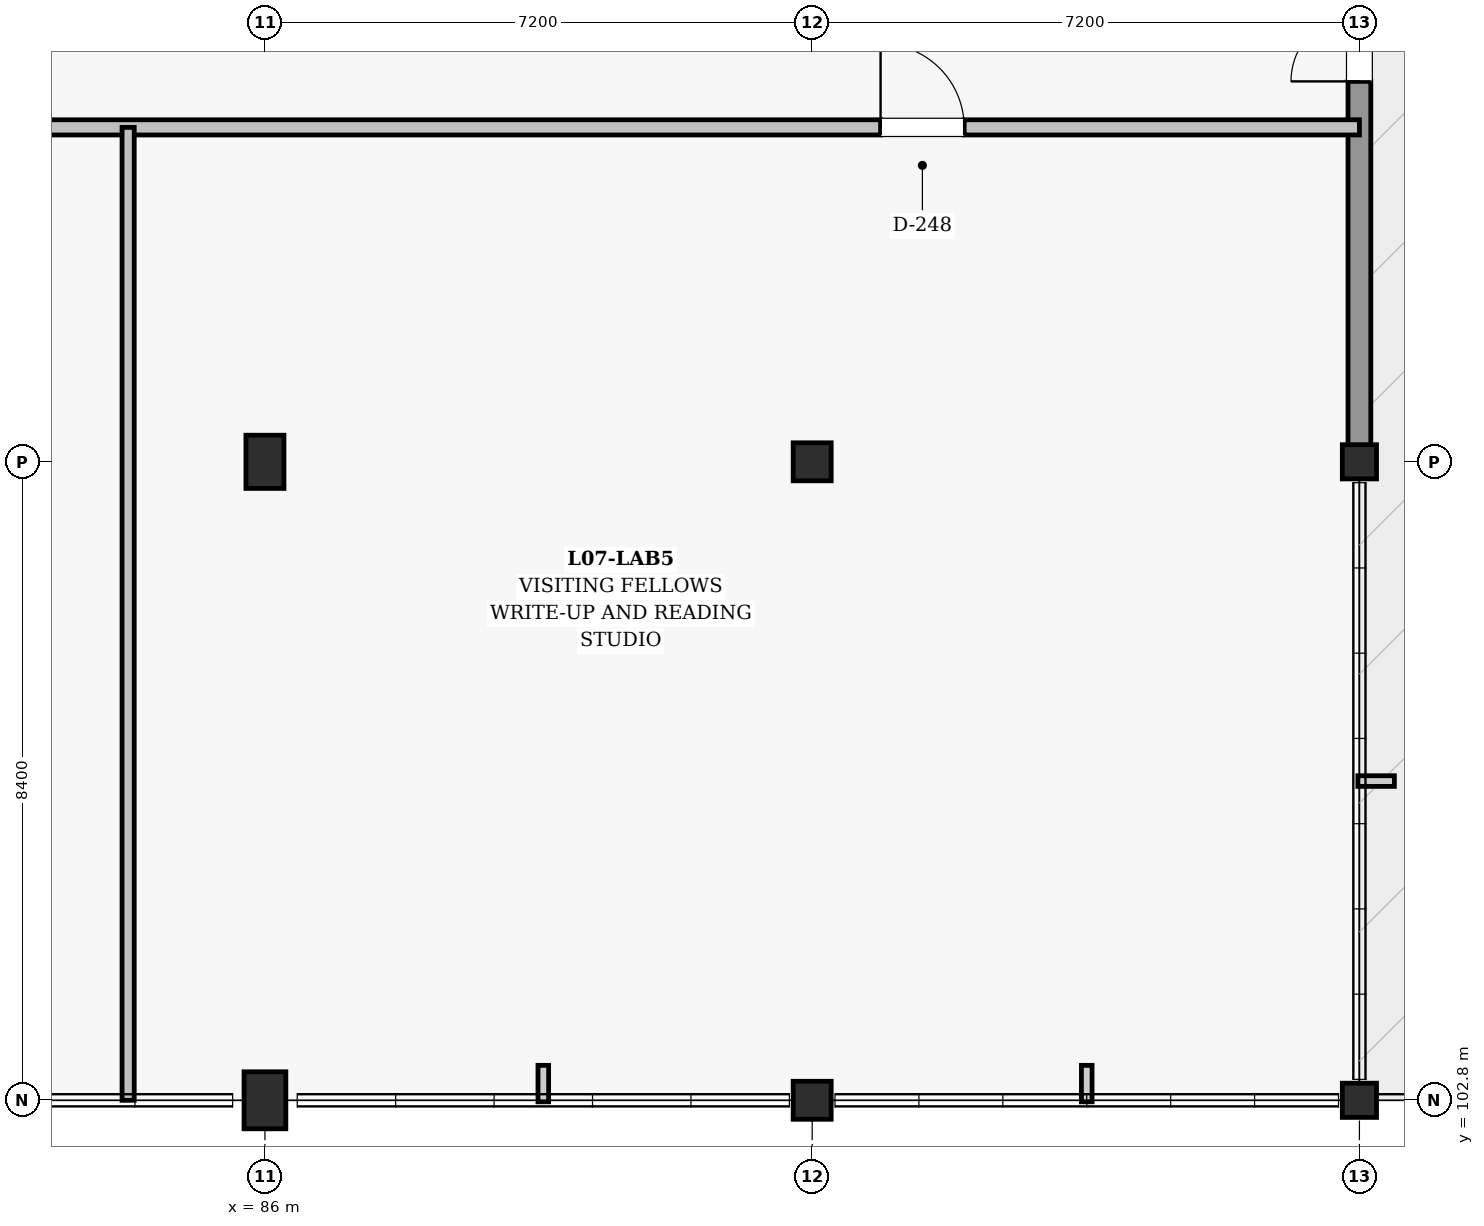
"""IFC4 building model, lengths in metres.
Left out: names, types, materials, properties, quantities, classifications, styles, units other than length and angle.
Written with IfcOpenShell. Run it as: python <this file> out.ifc"""

import sys

from ifc_helpers import new_model, si_unit, direction, frame, frame_2d, origin, origin_2d, place, context, subcontext, project, spatial, rectangle, extrude, element, fill, save


model = new_model("IFC4")
c1 = context("Model", 3, precision=1e-05, world=origin(), true_north=direction((0.0, 1.0)))
c2 = subcontext(c1, "Body", "Model", "MODEL_VIEW")
j1 = project(units=[si_unit("LENGTHUNIT", "METRE"), si_unit("PLANEANGLEUNIT", "RADIAN")], contexts=[c1])
p1 = place(None, origin())
s1 = spatial("IfcSite", under=j1, at=p1, CompositionType="ELEMENT")
p2 = place(p1, origin())
s2 = spatial("IfcBuilding", under=s1, at=p2, CompositionType="ELEMENT")
p3 = place(p2, frame((0.0, 0.0, 32.4)))
s3 = spatial("IfcBuildingStorey", under=s2, at=p3, CompositionType="ELEMENT", Elevation=32.4)
p4 = place(p3, frame((86.0, 102.8, 0.0), z_axis=(0.0, 0.0, 1.0), x_axis=(1.0, 0.0, 0.0)))
e1 = element("IfcColumn", 1, at=p4, inside=s3, PredefinedType="COLUMN", context=c2, shape_type="SweptSolid", body=[
    extrude(rectangle(XDim=0.55, YDim=0.75, at=origin_2d()), origin(), (0.0, 0.0, 1.0), 4.5),
])
p5 = place(p3, frame((86.0, 111.2, 0.0), z_axis=(0.0, 0.0, 1.0), x_axis=(1.0, 0.0, 0.0)))
e2 = element("IfcColumn", 2, at=p5, inside=s3, PredefinedType="COLUMN", context=c2, shape_type="SweptSolid", body=[
    extrude(rectangle(XDim=0.5, YDim=0.7, at=origin_2d()), origin(), (0.0, 0.0, 1.0), 4.5),
])
for number, where, z_axis, x_axis in (
    (3, (93.2, 102.8, 0.0), (0.0, 0.0, 1.0), (1.0, 0.0, 0.0)),
    (4, (93.2, 111.2, 0.0), (0.0, 0.0, 1.0), (1.0, 0.0, 0.0)),
):
    element("IfcColumn", number, at=place(p3, frame(where, z_axis=z_axis, x_axis=x_axis)), inside=s3, PredefinedType="COLUMN", context=c2, shape_type="SweptSolid", body=[
        extrude(rectangle(XDim=0.5, YDim=0.5, at=origin_2d()), origin(), (0.0, 0.0, 1.0), 4.5),
    ])
for number, where, z_axis, x_axis in (
    (5, (100.4, 102.8, 0.0), (0.0, 0.0, 1.0), (1.0, 0.0, 0.0)),
    (6, (100.4, 111.2, 0.0), (0.0, 0.0, 1.0), (1.0, 0.0, 0.0)),
):
    element("IfcColumn", number, at=place(p3, frame(where, z_axis=z_axis, x_axis=x_axis)), inside=s3, PredefinedType="COLUMN", context=c2, shape_type="SweptSolid", body=[
        extrude(rectangle(XDim=0.45, YDim=0.45, at=origin_2d()), origin(), (0.0, 0.0, 1.0), 4.5),
    ])
p6 = place(p3, frame((100.4, 111.405, 0.0), z_axis=(0.0, 0.0, 1.0), x_axis=(0.0, 1.0, 0.0)))
e7 = element("IfcWall", 7, at=p6, inside=s3, PredefinedType="SOLIDWALL", context=c2, shape_type="SweptSolid", body=[
    extrude(rectangle(XDim=7.965, YDim=0.3, at=frame_2d((3.982, 0.0))), origin(), (0.0, 0.0, 1.0), 3.355),
])
p7 = place(p6, frame((4.8, 0.0, 0.0)))
e8 = element("IfcOpeningElement", 8, at=p7, cuts=e7, PredefinedType="OPENING", context=c2, shape_type="SweptSolid", body=[
    extrude(rectangle(XDim=1.8, YDim=2.3, at=frame_2d((0.9, 1.15))), frame((0.0, 0.16, 0.0), z_axis=(0.0, -1.0, 0.0), x_axis=(1.0, 0.0, 0.0)), (0.0, 0.0, 1.0), 0.32),
])
p8 = place(p3, frame((14.0, 115.6, 0.0), z_axis=(0.0, 0.0, 1.0), x_axis=(1.0, 0.0, 0.0)))
e9 = element("IfcWall", 9, at=p8, inside=s3, PredefinedType="SOLIDWALL", context=c2, shape_type="SweptSolid", body=[
    extrude(rectangle(XDim=86.4, YDim=0.2, at=frame_2d((43.2, 0.0))), origin(), (0.0, 0.0, 1.0), 2.96),
])
p9 = place(p8, frame((29.9, 0.0, 0.0)))
e10 = element("IfcOpeningElement", 10, at=p9, cuts=e9, PredefinedType="OPENING", context=c2, shape_type="SweptSolid", body=[
    extrude(rectangle(XDim=1.1, YDim=2.15, at=frame_2d((0.55, 1.075))), frame((0.0, 0.11, 0.0), z_axis=(0.0, -1.0, 0.0), x_axis=(1.0, 0.0, 0.0)), (0.0, 0.0, 1.0), 0.22),
])
p10 = place(p8, frame((8.3, 0.0, 0.0)))
e11 = element("IfcOpeningElement", 11, at=p10, cuts=e9, PredefinedType="OPENING", context=c2, shape_type="SweptSolid", body=[
    extrude(rectangle(XDim=1.5, YDim=2.2, at=frame_2d((0.75, 1.1))), frame((0.0, 0.11, 0.0), z_axis=(0.0, -1.0, 0.0), x_axis=(1.0, 0.0, 0.0)), (0.0, 0.0, 1.0), 0.22),
])
p11 = place(p8, frame((24.7, 0.0, 0.0)))
e12 = element("IfcOpeningElement", 12, at=p11, cuts=e9, PredefinedType="OPENING", context=c2, shape_type="SweptSolid", body=[
    extrude(rectangle(XDim=1.5, YDim=2.2, at=frame_2d((0.75, 1.1))), frame((0.0, 0.11, 0.0), z_axis=(0.0, -1.0, 0.0), x_axis=(1.0, 0.0, 0.0)), (0.0, 0.0, 1.0), 0.22),
])
p12 = place(p8, frame((45.0, 0.0, 0.0)))
e13 = element("IfcOpeningElement", 13, at=p12, cuts=e9, PredefinedType="OPENING", context=c2, shape_type="SweptSolid", body=[
    extrude(rectangle(XDim=1.5, YDim=2.2, at=frame_2d((0.75, 1.1))), frame((0.0, 0.11, 0.0), z_axis=(0.0, -1.0, 0.0), x_axis=(1.0, 0.0, 0.0)), (0.0, 0.0, 1.0), 0.22),
])
p13 = place(p8, frame((62.1, 0.0, 0.0)))
e14 = element("IfcOpeningElement", 14, at=p13, cuts=e9, PredefinedType="OPENING", context=c2, shape_type="SweptSolid", body=[
    extrude(rectangle(XDim=1.5, YDim=2.2, at=frame_2d((0.75, 1.1))), frame((0.0, 0.11, 0.0), z_axis=(0.0, -1.0, 0.0), x_axis=(1.0, 0.0, 0.0)), (0.0, 0.0, 1.0), 0.22),
])
p14 = place(p8, frame((80.1, 0.0, 0.0)))
e15 = element("IfcOpeningElement", 15, at=p14, cuts=e9, PredefinedType="OPENING", context=c2, shape_type="SweptSolid", body=[
    extrude(rectangle(XDim=1.1, YDim=2.15, at=frame_2d((0.55, 1.075))), frame((0.0, 0.11, 0.0), z_axis=(0.0, -1.0, 0.0), x_axis=(1.0, 0.0, 0.0)), (0.0, 0.0, 1.0), 0.22),
])
p15 = place(p3, frame((84.2, 102.8, 0.0), z_axis=(0.0, 0.0, 1.0), x_axis=(0.0, 1.0, 0.0)))
e16 = element("IfcWall", 16, at=p15, inside=s3, PredefinedType="PARTITIONING", context=c2, shape_type="SweptSolid", body=[
    extrude(rectangle(XDim=12.8, YDim=0.16, at=frame_2d((6.4, 0.0))), origin(), (0.0, 0.0, 1.0), 3.41),
])
p16 = place(p7, origin())
e17 = element("IfcDoor", 17, at=p16, inside=s3, OperationType="DOUBLE_DOOR_SINGLE_SWING", PredefinedType="DOOR", context=c2, shape_type="SweptSolid", body=[
    extrude(rectangle(XDim=1.8, YDim=2.3, at=frame_2d((0.9, 1.15))), frame((0.0, 0.025, 0.0), z_axis=(0.0, -1.0, 0.0), x_axis=(1.0, 0.0, 0.0)), (0.0, 0.0, 1.0), 0.05),
])
fill(e8, e17)
p17 = place(p14, origin())
e18 = element("IfcDoor", 18, at=p17, inside=s3, OperationType="SINGLE_SWING_LEFT", PredefinedType="DOOR", context=c2, shape_type="SweptSolid", body=[
    extrude(rectangle(XDim=1.1, YDim=2.15, at=frame_2d((0.55, 1.075))), frame((0.0, 0.025, 0.0), z_axis=(0.0, -1.0, 0.0), x_axis=(1.0, 0.0, 0.0)), (0.0, 0.0, 1.0), 0.05),
])
fill(e15, e18)
save(model, sys.argv[1])
